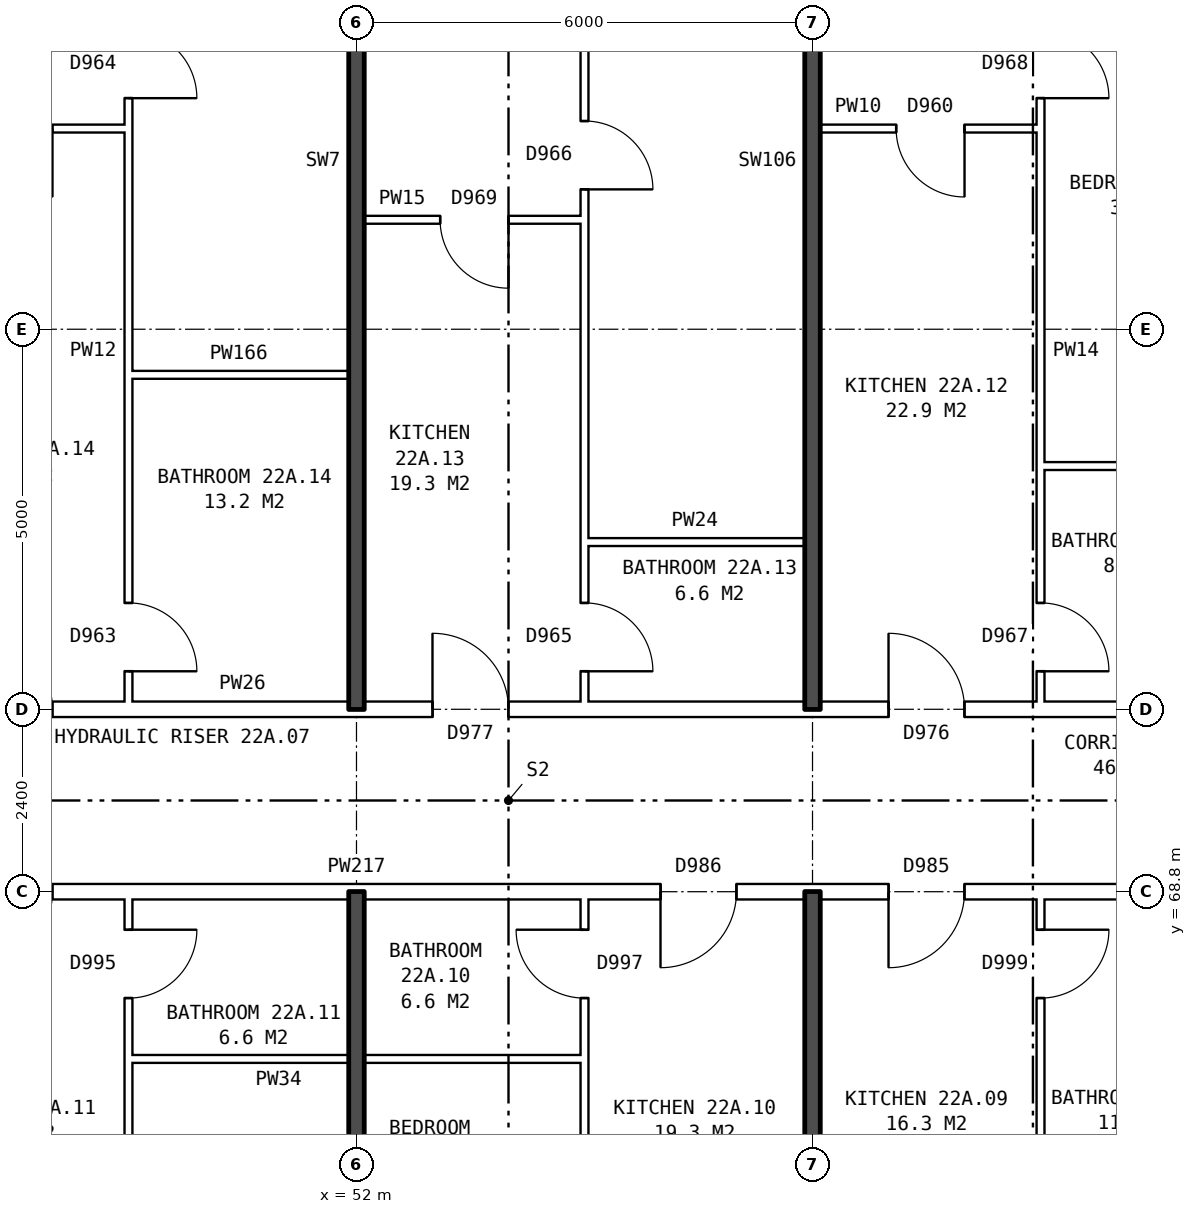
"""IFC4 building model, lengths in metres.
Left out: names, types, materials, properties, quantities, classifications, styles, units other than length and angle.
Written with IfcOpenShell. Run it as: python <this file> out.ifc"""

import sys

from ifc_helpers import new_model, si_unit, direction, frame, frame_2d, origin, place, context, subcontext, project, spatial, rectangle, extrude, element, fill, save


model = new_model("IFC4")
c1 = context("Model", 3, precision=1e-05, world=origin(), true_north=direction((0.0, 1.0)))
c2 = subcontext(c1, "Body", "Model", "MODEL_VIEW")
j1 = project(units=[si_unit("LENGTHUNIT", "METRE"), si_unit("PLANEANGLEUNIT", "RADIAN")], contexts=[c1])
p1 = place(None, origin())
s1 = spatial("IfcSite", under=j1, at=p1, CompositionType="ELEMENT")
p2 = place(p1, origin())
s2 = spatial("IfcBuilding", under=s1, at=p2, CompositionType="ELEMENT")
p3 = place(p2, frame((0.0, 0.0, 80.9)))
s3 = spatial("IfcBuildingStorey", under=s2, at=p3, CompositionType="ELEMENT", Elevation=80.9)
p4 = place(p3, frame((49.0, 66.6, 0.0), z_axis=(0.0, 0.0, 1.0), x_axis=(1.0, 0.0, 0.0)))
e1 = element("IfcWall", 1, at=p4, inside=s3, PredefinedType="PARTITIONING", context=c2, shape_type="SweptSolid", body=[
    extrude(rectangle(XDim=6.0, YDim=0.1, at=frame_2d((3.0, 0.0))), origin(), (0.0, 0.0, 1.0), 2.85),
])
p5 = place(p3, frame((44.36, 68.8, 0.0), z_axis=(0.0, 0.0, 1.0), x_axis=(1.0, 0.0, 0.0)))
e2 = element("IfcWall", 2, at=p5, inside=s3, PredefinedType="PARTITIONING", context=c2, shape_type="SweptSolid", body=[
    extrude(rectangle(XDim=19.28, YDim=0.2, at=frame_2d((9.64, 0.0))), origin(), (0.0, 0.0, 1.0), 2.85),
])
p6 = place(p5, frame((14.64, 0.0, 0.0)))
e3 = element("IfcOpeningElement", 3, at=p6, cuts=e2, PredefinedType="OPENING", context=c2, shape_type="SweptSolid", body=[
    extrude(rectangle(XDim=1.0, YDim=2.1, at=frame_2d((0.5, 1.05))), frame((0.0, 0.11, 0.0), z_axis=(0.0, -1.0, 0.0), x_axis=(1.0, 0.0, 0.0)), (0.0, 0.0, 1.0), 0.22),
])
p7 = place(p5, frame((11.64, 0.0, 0.0)))
e4 = element("IfcOpeningElement", 4, at=p7, cuts=e2, PredefinedType="OPENING", context=c2, shape_type="SweptSolid", body=[
    extrude(rectangle(XDim=1.0, YDim=2.1, at=frame_2d((0.5, 1.05))), frame((0.0, 0.11, 0.0), z_axis=(0.0, -1.0, 0.0), x_axis=(1.0, 0.0, 0.0)), (0.0, 0.0, 1.0), 0.22),
])
p8 = place(p5, frame((2.64, 0.0, 0.0)))
e5 = element("IfcOpeningElement", 5, at=p8, cuts=e2, PredefinedType="OPENING", context=c2, shape_type="SweptSolid", body=[
    extrude(rectangle(XDim=1.0, YDim=2.1, at=frame_2d((0.5, 1.05))), frame((0.0, 0.11, 0.0), z_axis=(0.0, -1.0, 0.0), x_axis=(1.0, 0.0, 0.0)), (0.0, 0.0, 1.0), 0.22),
])
p9 = place(p3, frame((44.36, 71.2, 0.0), z_axis=(0.0, 0.0, 1.0), x_axis=(1.0, 0.0, 0.0)))
e6 = element("IfcWall", 6, at=p9, inside=s3, PredefinedType="PARTITIONING", context=c2, shape_type="SweptSolid", body=[
    extrude(rectangle(XDim=19.28, YDim=0.2, at=frame_2d((9.64, 0.0))), origin(), (0.0, 0.0, 1.0), 2.85),
])
p10 = place(p9, frame((14.64, 0.0, 0.0)))
e7 = element("IfcOpeningElement", 7, at=p10, cuts=e6, PredefinedType="OPENING", context=c2, shape_type="SweptSolid", body=[
    extrude(rectangle(XDim=1.0, YDim=2.1, at=frame_2d((0.5, 1.05))), frame((0.0, 0.11, 0.0), z_axis=(0.0, -1.0, 0.0), x_axis=(1.0, 0.0, 0.0)), (0.0, 0.0, 1.0), 0.22),
])
p11 = place(p9, frame((8.64, 0.0, 0.0)))
e8 = element("IfcOpeningElement", 8, at=p11, cuts=e6, PredefinedType="OPENING", context=c2, shape_type="SweptSolid", body=[
    extrude(rectangle(XDim=1.0, YDim=2.1, at=frame_2d((0.5, 1.05))), frame((0.0, 0.11, 0.0), z_axis=(0.0, -1.0, 0.0), x_axis=(1.0, 0.0, 0.0)), (0.0, 0.0, 1.0), 0.22),
])
p12 = place(p9, frame((2.64, 0.0, 0.0)))
e9 = element("IfcOpeningElement", 9, at=p12, cuts=e6, PredefinedType="OPENING", context=c2, shape_type="SweptSolid", body=[
    extrude(rectangle(XDim=1.0, YDim=2.1, at=frame_2d((0.5, 1.05))), frame((0.0, 0.11, 0.0), z_axis=(0.0, -1.0, 0.0), x_axis=(1.0, 0.0, 0.0)), (0.0, 0.0, 1.0), 0.22),
])
p13 = place(p3, frame((55.0, 73.4, 0.0), z_axis=(0.0, 0.0, 1.0), x_axis=(1.0, 0.0, 0.0)))
e10 = element("IfcWall", 10, at=p13, inside=s3, PredefinedType="PARTITIONING", context=c2, shape_type="SweptSolid", body=[
    extrude(rectangle(XDim=2.9, YDim=0.1, at=frame_2d((1.45, 0.0))), origin(), (0.0, 0.0, 1.0), 2.85),
])
p14 = place(p3, frame((61.0, 74.4, 0.0), z_axis=(0.0, 0.0, 1.0), x_axis=(1.0, 0.0, 0.0)))
e11 = element("IfcWall", 11, at=p14, inside=s3, PredefinedType="PARTITIONING", context=c2, shape_type="SweptSolid", body=[
    extrude(rectangle(XDim=2.64, YDim=0.1, at=frame_2d((1.32, 0.0))), origin(), (0.0, 0.0, 1.0), 2.85),
])
p15 = place(p3, frame((49.0, 75.6, 0.0), z_axis=(0.0, 0.0, 1.0), x_axis=(1.0, 0.0, 0.0)))
e12 = element("IfcWall", 12, at=p15, inside=s3, PredefinedType="PARTITIONING", context=c2, shape_type="SweptSolid", body=[
    extrude(rectangle(XDim=2.9, YDim=0.1, at=frame_2d((1.45, 0.0))), origin(), (0.0, 0.0, 1.0), 2.85),
])
p16 = place(p3, frame((52.1, 77.64, 0.0), z_axis=(0.0, 0.0, 1.0), x_axis=(1.0, 0.0, 0.0)))
e13 = element("IfcWall", 13, at=p16, inside=s3, PredefinedType="PARTITIONING", context=c2, shape_type="SweptSolid", body=[
    extrude(rectangle(XDim=2.9, YDim=0.1, at=frame_2d((1.45, 0.0))), origin(), (0.0, 0.0, 1.0), 2.85),
])
p17 = place(p16, frame((1.0, 0.0, 0.0)))
e14 = element("IfcOpeningElement", 14, at=p17, cuts=e13, PredefinedType="OPENING", context=c2, shape_type="SweptSolid", body=[
    extrude(rectangle(XDim=0.9, YDim=2.1, at=frame_2d((0.45, 1.05))), frame((0.0, 0.06, 0.0), z_axis=(0.0, -1.0, 0.0), x_axis=(1.0, 0.0, 0.0)), (0.0, 0.0, 1.0), 0.12),
])
p18 = place(p3, frame((46.1, 78.84, 0.0), z_axis=(0.0, 0.0, 1.0), x_axis=(1.0, 0.0, 0.0)))
e15 = element("IfcWall", 15, at=p18, inside=s3, PredefinedType="PARTITIONING", context=c2, shape_type="SweptSolid", body=[
    extrude(rectangle(XDim=2.9, YDim=0.1, at=frame_2d((1.45, 0.0))), origin(), (0.0, 0.0, 1.0), 2.85),
])
p19 = place(p18, frame((1.0, 0.0, 0.0)))
e16 = element("IfcOpeningElement", 16, at=p19, cuts=e15, PredefinedType="OPENING", context=c2, shape_type="SweptSolid", body=[
    extrude(rectangle(XDim=0.9, YDim=2.1, at=frame_2d((0.45, 1.05))), frame((0.0, 0.06, 0.0), z_axis=(0.0, -1.0, 0.0), x_axis=(1.0, 0.0, 0.0)), (0.0, 0.0, 1.0), 0.12),
])
p20 = place(p3, frame((58.1, 78.84, 0.0), z_axis=(0.0, 0.0, 1.0), x_axis=(1.0, 0.0, 0.0)))
e17 = element("IfcWall", 17, at=p20, inside=s3, PredefinedType="PARTITIONING", context=c2, shape_type="SweptSolid", body=[
    extrude(rectangle(XDim=2.9, YDim=0.1, at=frame_2d((1.45, 0.0))), origin(), (0.0, 0.0, 1.0), 2.85),
])
p21 = place(p20, frame((1.0, 0.0, 0.0)))
e18 = element("IfcOpeningElement", 18, at=p21, cuts=e17, PredefinedType="OPENING", context=c2, shape_type="SweptSolid", body=[
    extrude(rectangle(XDim=0.9, YDim=2.1, at=frame_2d((0.45, 1.05))), frame((0.0, 0.06, 0.0), z_axis=(0.0, -1.0, 0.0), x_axis=(1.0, 0.0, 0.0)), (0.0, 0.0, 1.0), 0.12),
])
p22 = place(p3, frame((49.0, 54.36, 0.0), z_axis=(0.0, 0.0, 1.0), x_axis=(0.0, 1.0, 0.0)))
e19 = element("IfcWall", 19, at=p22, inside=s3, PredefinedType="PARTITIONING", context=c2, shape_type="SweptSolid", body=[
    extrude(rectangle(XDim=14.34, YDim=0.1, at=frame_2d((7.17, 0.0))), origin(), (0.0, 0.0, 1.0), 2.85),
])
p23 = place(p22, frame((5.5, 0.0, 0.0)))
e20 = element("IfcOpeningElement", 20, at=p23, cuts=e19, PredefinedType="OPENING", context=c2, shape_type="SweptSolid", body=[
    extrude(rectangle(XDim=0.9, YDim=2.1, at=frame_2d((0.45, 1.05))), frame((0.0, 0.06, 0.0), z_axis=(0.0, -1.0, 0.0), x_axis=(1.0, 0.0, 0.0)), (0.0, 0.0, 1.0), 0.12),
])
p24 = place(p22, frame((13.04, 0.0, 0.0)))
e21 = element("IfcOpeningElement", 21, at=p24, cuts=e19, PredefinedType="OPENING", context=c2, shape_type="SweptSolid", body=[
    extrude(rectangle(XDim=0.9, YDim=2.1, at=frame_2d((0.45, 1.05))), frame((0.0, 0.06, 0.0), z_axis=(0.0, -1.0, 0.0), x_axis=(1.0, 0.0, 0.0)), (0.0, 0.0, 1.0), 0.12),
])
p25 = place(p3, frame((49.0, 71.3, 0.0), z_axis=(0.0, 0.0, 1.0), x_axis=(0.0, 1.0, 0.0)))
e22 = element("IfcWall", 22, at=p25, inside=s3, PredefinedType="PARTITIONING", context=c2, shape_type="SweptSolid", body=[
    extrude(rectangle(XDim=14.34, YDim=0.1, at=frame_2d((7.17, 0.0))), origin(), (0.0, 0.0, 1.0), 2.85),
])
p26 = place(p25, frame((7.94, 0.0, 0.0)))
e23 = element("IfcOpeningElement", 23, at=p26, cuts=e22, PredefinedType="OPENING", context=c2, shape_type="SweptSolid", body=[
    extrude(rectangle(XDim=0.9, YDim=2.1, at=frame_2d((0.45, 1.05))), frame((0.0, 0.06, 0.0), z_axis=(0.0, -1.0, 0.0), x_axis=(1.0, 0.0, 0.0)), (0.0, 0.0, 1.0), 0.12),
])
p27 = place(p25, frame((0.4, 0.0, 0.0)))
e24 = element("IfcOpeningElement", 24, at=p27, cuts=e22, PredefinedType="OPENING", context=c2, shape_type="SweptSolid", body=[
    extrude(rectangle(XDim=0.9, YDim=2.1, at=frame_2d((0.45, 1.05))), frame((0.0, 0.06, 0.0), z_axis=(0.0, -1.0, 0.0), x_axis=(1.0, 0.0, 0.0)), (0.0, 0.0, 1.0), 0.12),
])
for number, where, z_axis, x_axis in (
    (25, (52.0, 54.36, 0.0), (0.0, 0.0, 1.0), (0.0, 1.0, 0.0)),
    (26, (52.0, 71.2, 0.0), (0.0, 0.0, 1.0), (0.0, 1.0, 0.0)),
):
    element("IfcWall", number, at=place(p3, frame(where, z_axis=z_axis, x_axis=x_axis)), inside=s3, PredefinedType="SOLIDWALL", context=c2, shape_type="SweptSolid", body=[
        extrude(rectangle(XDim=14.44, YDim=0.2, at=frame_2d((7.22, 0.0))), origin(), (0.0, 0.0, 1.0), 2.85),
    ])
p28 = place(p3, frame((55.0, 54.36, 0.0), z_axis=(0.0, 0.0, 1.0), x_axis=(0.0, 1.0, 0.0)))
e27 = element("IfcWall", 27, at=p28, inside=s3, PredefinedType="PARTITIONING", context=c2, shape_type="SweptSolid", body=[
    extrude(rectangle(XDim=14.34, YDim=0.1, at=frame_2d((7.17, 0.0))), origin(), (0.0, 0.0, 1.0), 2.85),
])
p29 = place(p28, frame((6.7, 0.0, 0.0)))
e28 = element("IfcOpeningElement", 28, at=p29, cuts=e27, PredefinedType="OPENING", context=c2, shape_type="SweptSolid", body=[
    extrude(rectangle(XDim=0.9, YDim=2.1, at=frame_2d((0.45, 1.05))), frame((0.0, 0.06, 0.0), z_axis=(0.0, -1.0, 0.0), x_axis=(1.0, 0.0, 0.0)), (0.0, 0.0, 1.0), 0.12),
])
p30 = place(p28, frame((13.04, 0.0, 0.0)))
e29 = element("IfcOpeningElement", 29, at=p30, cuts=e27, PredefinedType="OPENING", context=c2, shape_type="SweptSolid", body=[
    extrude(rectangle(XDim=0.9, YDim=2.1, at=frame_2d((0.45, 1.05))), frame((0.0, 0.06, 0.0), z_axis=(0.0, -1.0, 0.0), x_axis=(1.0, 0.0, 0.0)), (0.0, 0.0, 1.0), 0.12),
])
p31 = place(p3, frame((55.0, 71.3, 0.0), z_axis=(0.0, 0.0, 1.0), x_axis=(0.0, 1.0, 0.0)))
e30 = element("IfcWall", 30, at=p31, inside=s3, PredefinedType="PARTITIONING", context=c2, shape_type="SweptSolid", body=[
    extrude(rectangle(XDim=14.34, YDim=0.1, at=frame_2d((7.17, 0.0))), origin(), (0.0, 0.0, 1.0), 2.85),
])
p32 = place(p31, frame((6.74, 0.0, 0.0)))
e31 = element("IfcOpeningElement", 31, at=p32, cuts=e30, PredefinedType="OPENING", context=c2, shape_type="SweptSolid", body=[
    extrude(rectangle(XDim=0.9, YDim=2.1, at=frame_2d((0.45, 1.05))), frame((0.0, 0.06, 0.0), z_axis=(0.0, -1.0, 0.0), x_axis=(1.0, 0.0, 0.0)), (0.0, 0.0, 1.0), 0.12),
])
p33 = place(p31, frame((0.4, 0.0, 0.0)))
e32 = element("IfcOpeningElement", 32, at=p33, cuts=e30, PredefinedType="OPENING", context=c2, shape_type="SweptSolid", body=[
    extrude(rectangle(XDim=0.9, YDim=2.1, at=frame_2d((0.45, 1.05))), frame((0.0, 0.06, 0.0), z_axis=(0.0, -1.0, 0.0), x_axis=(1.0, 0.0, 0.0)), (0.0, 0.0, 1.0), 0.12),
])
for number, where, z_axis, x_axis in (
    (33, (58.0, 54.36, 0.0), (0.0, 0.0, 1.0), (0.0, 1.0, 0.0)),
    (34, (58.0, 71.2, 0.0), (0.0, 0.0, 1.0), (0.0, 1.0, 0.0)),
):
    element("IfcWall", number, at=place(p3, frame(where, z_axis=z_axis, x_axis=x_axis)), inside=s3, PredefinedType="SOLIDWALL", context=c2, shape_type="SweptSolid", body=[
        extrude(rectangle(XDim=14.44, YDim=0.2, at=frame_2d((7.22, 0.0))), origin(), (0.0, 0.0, 1.0), 2.85),
    ])
p34 = place(p3, frame((61.0, 54.36, 0.0), z_axis=(0.0, 0.0, 1.0), x_axis=(0.0, 1.0, 0.0)))
e35 = element("IfcWall", 35, at=p34, inside=s3, PredefinedType="PARTITIONING", context=c2, shape_type="SweptSolid", body=[
    extrude(rectangle(XDim=14.34, YDim=0.1, at=frame_2d((7.17, 0.0))), origin(), (0.0, 0.0, 1.0), 2.85),
])
p35 = place(p34, frame((7.7, 0.0, 0.0)))
e36 = element("IfcOpeningElement", 36, at=p35, cuts=e35, PredefinedType="OPENING", context=c2, shape_type="SweptSolid", body=[
    extrude(rectangle(XDim=0.9, YDim=2.1, at=frame_2d((0.45, 1.05))), frame((0.0, 0.06, 0.0), z_axis=(0.0, -1.0, 0.0), x_axis=(1.0, 0.0, 0.0)), (0.0, 0.0, 1.0), 0.12),
])
p36 = place(p34, frame((13.04, 0.0, 0.0)))
e37 = element("IfcOpeningElement", 37, at=p36, cuts=e35, PredefinedType="OPENING", context=c2, shape_type="SweptSolid", body=[
    extrude(rectangle(XDim=0.9, YDim=2.1, at=frame_2d((0.45, 1.05))), frame((0.0, 0.06, 0.0), z_axis=(0.0, -1.0, 0.0), x_axis=(1.0, 0.0, 0.0)), (0.0, 0.0, 1.0), 0.12),
])
p37 = place(p3, frame((61.0, 71.3, 0.0), z_axis=(0.0, 0.0, 1.0), x_axis=(0.0, 1.0, 0.0)))
e38 = element("IfcWall", 38, at=p37, inside=s3, PredefinedType="PARTITIONING", context=c2, shape_type="SweptSolid", body=[
    extrude(rectangle(XDim=14.34, YDim=0.1, at=frame_2d((7.17, 0.0))), origin(), (0.0, 0.0, 1.0), 2.85),
])
p38 = place(p37, frame((7.94, 0.0, 0.0)))
e39 = element("IfcOpeningElement", 39, at=p38, cuts=e38, PredefinedType="OPENING", context=c2, shape_type="SweptSolid", body=[
    extrude(rectangle(XDim=0.9, YDim=2.1, at=frame_2d((0.45, 1.05))), frame((0.0, 0.06, 0.0), z_axis=(0.0, -1.0, 0.0), x_axis=(1.0, 0.0, 0.0)), (0.0, 0.0, 1.0), 0.12),
])
p39 = place(p37, frame((0.4, 0.0, 0.0)))
e40 = element("IfcOpeningElement", 40, at=p39, cuts=e38, PredefinedType="OPENING", context=c2, shape_type="SweptSolid", body=[
    extrude(rectangle(XDim=0.9, YDim=2.1, at=frame_2d((0.45, 1.05))), frame((0.0, 0.06, 0.0), z_axis=(0.0, -1.0, 0.0), x_axis=(1.0, 0.0, 0.0)), (0.0, 0.0, 1.0), 0.12),
])
p40 = place(p6, frame((1.0, 0.0, 0.0), z_axis=(0.0, 0.0, 1.0), x_axis=(-1.0, 0.0, 0.0)))
e41 = element("IfcDoor", 41, at=p40, inside=s3, OperationType="SINGLE_SWING_RIGHT", PredefinedType="DOOR", context=c2, shape_type="SweptSolid", body=[
    extrude(rectangle(XDim=1.0, YDim=2.1, at=frame_2d((0.5, 1.05))), frame((0.0, 0.025, 0.0), z_axis=(0.0, -1.0, 0.0), x_axis=(1.0, 0.0, 0.0)), (0.0, 0.0, 1.0), 0.05),
])
fill(e3, e41)
p41 = place(p36, frame((0.9, 0.0, 0.0), z_axis=(0.0, 0.0, 1.0), x_axis=(-1.0, 0.0, 0.0)))
e42 = element("IfcDoor", 42, at=p41, inside=s3, OperationType="SINGLE_SWING_LEFT", PredefinedType="DOOR", context=c2, shape_type="SweptSolid", body=[
    extrude(rectangle(XDim=0.9, YDim=2.1, at=frame_2d((0.45, 1.05))), frame((0.0, 0.025, 0.0), z_axis=(0.0, -1.0, 0.0), x_axis=(1.0, 0.0, 0.0)), (0.0, 0.0, 1.0), 0.05),
])
fill(e37, e42)
p42 = place(p7, frame((1.0, 0.0, 0.0), z_axis=(0.0, 0.0, 1.0), x_axis=(-1.0, 0.0, 0.0)))
e43 = element("IfcDoor", 43, at=p42, inside=s3, OperationType="SINGLE_SWING_RIGHT", PredefinedType="DOOR", context=c2, shape_type="SweptSolid", body=[
    extrude(rectangle(XDim=1.0, YDim=2.1, at=frame_2d((0.5, 1.05))), frame((0.0, 0.025, 0.0), z_axis=(0.0, -1.0, 0.0), x_axis=(1.0, 0.0, 0.0)), (0.0, 0.0, 1.0), 0.05),
])
fill(e4, e43)
p43 = place(p30, origin())
e44 = element("IfcDoor", 44, at=p43, inside=s3, OperationType="SINGLE_SWING_RIGHT", PredefinedType="DOOR", context=c2, shape_type="SweptSolid", body=[
    extrude(rectangle(XDim=0.9, YDim=2.1, at=frame_2d((0.45, 1.05))), frame((0.0, 0.025, 0.0), z_axis=(0.0, -1.0, 0.0), x_axis=(1.0, 0.0, 0.0)), (0.0, 0.0, 1.0), 0.05),
])
fill(e29, e44)
p44 = place(p24, frame((0.9, 0.0, 0.0), z_axis=(0.0, 0.0, 1.0), x_axis=(-1.0, 0.0, 0.0)))
e45 = element("IfcDoor", 45, at=p44, inside=s3, OperationType="SINGLE_SWING_LEFT", PredefinedType="DOOR", context=c2, shape_type="SweptSolid", body=[
    extrude(rectangle(XDim=0.9, YDim=2.1, at=frame_2d((0.45, 1.05))), frame((0.0, 0.025, 0.0), z_axis=(0.0, -1.0, 0.0), x_axis=(1.0, 0.0, 0.0)), (0.0, 0.0, 1.0), 0.05),
])
fill(e21, e45)
p45 = place(p38, frame((0.9, 0.0, 0.0), z_axis=(0.0, 0.0, 1.0), x_axis=(-1.0, 0.0, 0.0)))
e46 = element("IfcDoor", 46, at=p45, inside=s3, OperationType="SINGLE_SWING_RIGHT", PredefinedType="DOOR", context=c2, shape_type="SweptSolid", body=[
    extrude(rectangle(XDim=0.9, YDim=2.1, at=frame_2d((0.45, 1.05))), frame((0.0, 0.025, 0.0), z_axis=(0.0, -1.0, 0.0), x_axis=(1.0, 0.0, 0.0)), (0.0, 0.0, 1.0), 0.05),
])
fill(e39, e46)
p46 = place(p10, origin())
e47 = element("IfcDoor", 47, at=p46, inside=s3, OperationType="SINGLE_SWING_LEFT", PredefinedType="DOOR", context=c2, shape_type="SweptSolid", body=[
    extrude(rectangle(XDim=1.0, YDim=2.1, at=frame_2d((0.5, 1.05))), frame((0.0, 0.025, 0.0), z_axis=(0.0, -1.0, 0.0), x_axis=(1.0, 0.0, 0.0)), (0.0, 0.0, 1.0), 0.05),
])
fill(e7, e47)
p47 = place(p21, frame((0.9, 0.0, 0.0), z_axis=(0.0, 0.0, 1.0), x_axis=(-1.0, 0.0, 0.0)))
e48 = element("IfcDoor", 48, at=p47, inside=s3, OperationType="SINGLE_SWING_LEFT", PredefinedType="DOOR", context=c2, shape_type="SweptSolid", body=[
    extrude(rectangle(XDim=0.9, YDim=2.1, at=frame_2d((0.45, 1.05))), frame((0.0, 0.025, 0.0), z_axis=(0.0, -1.0, 0.0), x_axis=(1.0, 0.0, 0.0)), (0.0, 0.0, 1.0), 0.05),
])
fill(e18, e48)
p48 = place(p39, frame((0.9, 0.0, 0.0), z_axis=(0.0, 0.0, 1.0), x_axis=(-1.0, 0.0, 0.0)))
e49 = element("IfcDoor", 49, at=p48, inside=s3, OperationType="SINGLE_SWING_RIGHT", PredefinedType="DOOR", context=c2, shape_type="SweptSolid", body=[
    extrude(rectangle(XDim=0.9, YDim=2.1, at=frame_2d((0.45, 1.05))), frame((0.0, 0.025, 0.0), z_axis=(0.0, -1.0, 0.0), x_axis=(1.0, 0.0, 0.0)), (0.0, 0.0, 1.0), 0.05),
])
fill(e40, e49)
p49 = place(p32, frame((0.9, 0.0, 0.0), z_axis=(0.0, 0.0, 1.0), x_axis=(-1.0, 0.0, 0.0)))
e50 = element("IfcDoor", 50, at=p49, inside=s3, OperationType="SINGLE_SWING_RIGHT", PredefinedType="DOOR", context=c2, shape_type="SweptSolid", body=[
    extrude(rectangle(XDim=0.9, YDim=2.1, at=frame_2d((0.45, 1.05))), frame((0.0, 0.025, 0.0), z_axis=(0.0, -1.0, 0.0), x_axis=(1.0, 0.0, 0.0)), (0.0, 0.0, 1.0), 0.05),
])
fill(e31, e50)
p50 = place(p11, origin())
e51 = element("IfcDoor", 51, at=p50, inside=s3, OperationType="SINGLE_SWING_LEFT", PredefinedType="DOOR", context=c2, shape_type="SweptSolid", body=[
    extrude(rectangle(XDim=1.0, YDim=2.1, at=frame_2d((0.5, 1.05))), frame((0.0, 0.025, 0.0), z_axis=(0.0, -1.0, 0.0), x_axis=(1.0, 0.0, 0.0)), (0.0, 0.0, 1.0), 0.05),
])
fill(e8, e51)
p51 = place(p17, frame((0.9, 0.0, 0.0), z_axis=(0.0, 0.0, 1.0), x_axis=(-1.0, 0.0, 0.0)))
e52 = element("IfcDoor", 52, at=p51, inside=s3, OperationType="SINGLE_SWING_LEFT", PredefinedType="DOOR", context=c2, shape_type="SweptSolid", body=[
    extrude(rectangle(XDim=0.9, YDim=2.1, at=frame_2d((0.45, 1.05))), frame((0.0, 0.025, 0.0), z_axis=(0.0, -1.0, 0.0), x_axis=(1.0, 0.0, 0.0)), (0.0, 0.0, 1.0), 0.05),
])
fill(e14, e52)
p52 = place(p33, frame((0.9, 0.0, 0.0), z_axis=(0.0, 0.0, 1.0), x_axis=(-1.0, 0.0, 0.0)))
e53 = element("IfcDoor", 53, at=p52, inside=s3, OperationType="SINGLE_SWING_RIGHT", PredefinedType="DOOR", context=c2, shape_type="SweptSolid", body=[
    extrude(rectangle(XDim=0.9, YDim=2.1, at=frame_2d((0.45, 1.05))), frame((0.0, 0.025, 0.0), z_axis=(0.0, -1.0, 0.0), x_axis=(1.0, 0.0, 0.0)), (0.0, 0.0, 1.0), 0.05),
])
fill(e32, e53)
p53 = place(p26, frame((0.9, 0.0, 0.0), z_axis=(0.0, 0.0, 1.0), x_axis=(-1.0, 0.0, 0.0)))
e54 = element("IfcDoor", 54, at=p53, inside=s3, OperationType="SINGLE_SWING_RIGHT", PredefinedType="DOOR", context=c2, shape_type="SweptSolid", body=[
    extrude(rectangle(XDim=0.9, YDim=2.1, at=frame_2d((0.45, 1.05))), frame((0.0, 0.025, 0.0), z_axis=(0.0, -1.0, 0.0), x_axis=(1.0, 0.0, 0.0)), (0.0, 0.0, 1.0), 0.05),
])
fill(e23, e54)
p54 = place(p27, frame((0.9, 0.0, 0.0), z_axis=(0.0, 0.0, 1.0), x_axis=(-1.0, 0.0, 0.0)))
e55 = element("IfcDoor", 55, at=p54, inside=s3, OperationType="SINGLE_SWING_RIGHT", PredefinedType="DOOR", context=c2, shape_type="SweptSolid", body=[
    extrude(rectangle(XDim=0.9, YDim=2.1, at=frame_2d((0.45, 1.05))), frame((0.0, 0.025, 0.0), z_axis=(0.0, -1.0, 0.0), x_axis=(1.0, 0.0, 0.0)), (0.0, 0.0, 1.0), 0.05),
])
fill(e24, e55)
save(model, sys.argv[1])
